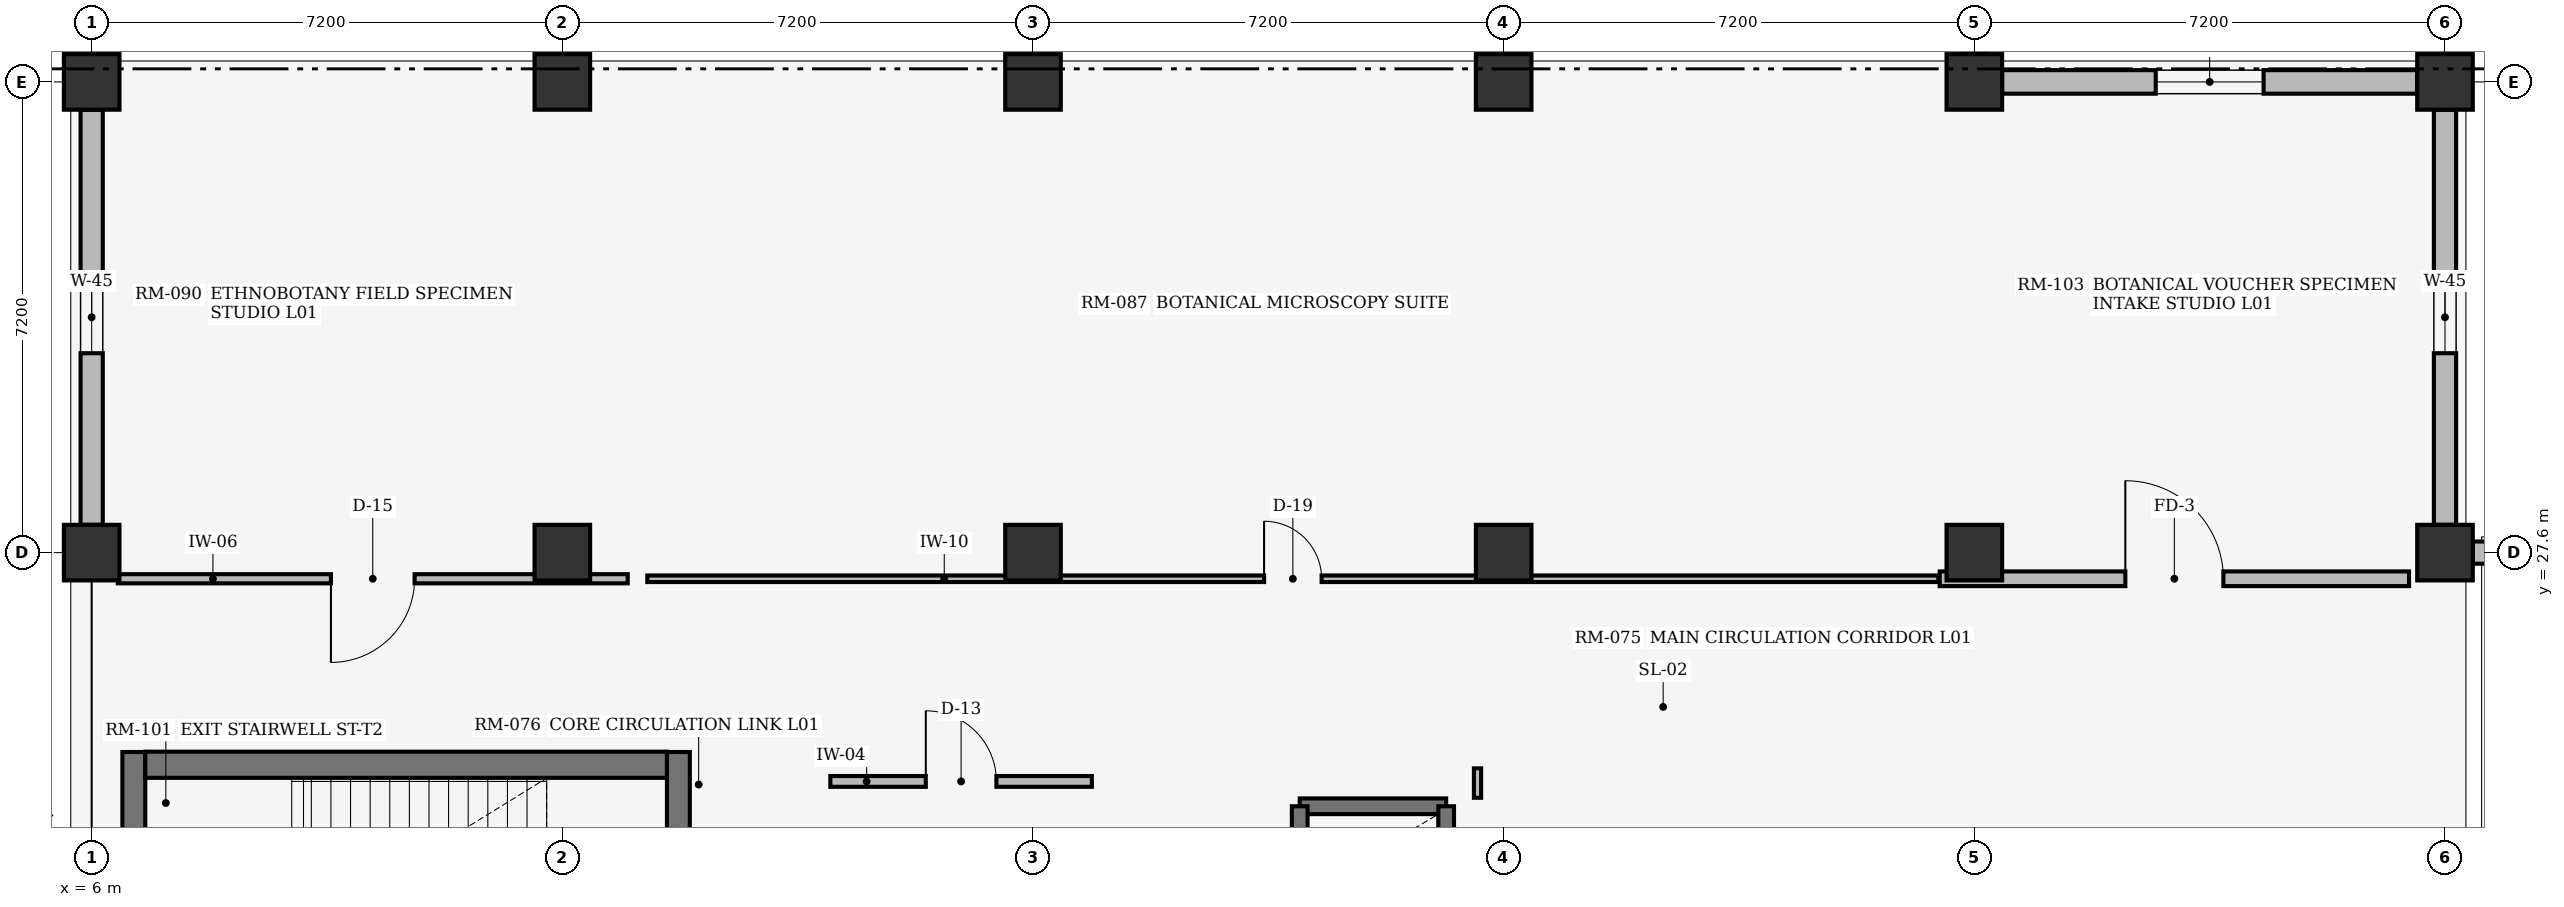
"""IFC4 building model, lengths in metres.
Left out: names, types, materials, properties, quantities, classifications, styles, units other than length and angle.
Written with IfcOpenShell. Run it as: python <this file> out.ifc"""

import sys

from ifc_helpers import new_model, si_unit, direction, frame, frame_2d, origin, origin_2d, place, context, subcontext, project, spatial, rectangle, extrude, element, fill, save


model = new_model("IFC4")
c1 = context("Model", 3, precision=1e-05, world=origin(), true_north=direction((0.0, 1.0)))
c2 = subcontext(c1, "Body", "Model", "MODEL_VIEW")
j1 = project(units=[si_unit("LENGTHUNIT", "METRE"), si_unit("PLANEANGLEUNIT", "RADIAN")], contexts=[c1])
p1 = place(None, origin())
s1 = spatial("IfcSite", under=j1, at=p1, CompositionType="ELEMENT")
p2 = place(p1, origin())
s2 = spatial("IfcBuilding", under=s1, at=p2, CompositionType="ELEMENT")
p3 = place(p2, frame((0.0, 0.0, 4.8)))
s3 = spatial("IfcBuildingStorey", under=s2, at=p3, CompositionType="ELEMENT", Elevation=4.8)
for number, where, z_axis, x_axis in (
    (1, (6.0, 27.6, 0.0), (0.0, 0.0, 1.0), (1.0, 0.0, 0.0)),
    (2, (6.0, 34.8, 0.0), (0.0, 0.0, 1.0), (1.0, 0.0, 0.0)),
    (3, (13.2, 27.6, 0.0), (0.0, 0.0, 1.0), (1.0, 0.0, 0.0)),
    (4, (13.2, 34.8, 0.0), (0.0, 0.0, 1.0), (1.0, 0.0, 0.0)),
    (5, (20.4, 27.6, 0.0), (0.0, 0.0, 1.0), (1.0, 0.0, 0.0)),
    (6, (20.4, 34.8, 0.0), (0.0, 0.0, 1.0), (1.0, 0.0, 0.0)),
    (7, (27.6, 27.6, 0.0), (0.0, 0.0, 1.0), (1.0, 0.0, 0.0)),
    (8, (27.6, 34.8, 0.0), (0.0, 0.0, 1.0), (1.0, 0.0, 0.0)),
    (9, (34.8, 27.6, 0.0), (0.0, 0.0, 1.0), (1.0, 0.0, 0.0)),
    (10, (34.8, 34.8, 0.0), (0.0, 0.0, 1.0), (1.0, 0.0, 0.0)),
    (11, (42.0, 27.6, 0.0), (0.0, 0.0, 1.0), (1.0, 0.0, 0.0)),
    (12, (42.0, 34.8, 0.0), (0.0, 0.0, 1.0), (1.0, 0.0, 0.0)),
):
    element("IfcColumn", number, at=place(p3, frame(where, z_axis=z_axis, x_axis=x_axis)), inside=s3, PredefinedType="COLUMN", context=c2, shape_type="SweptSolid", body=[
        extrude(rectangle(XDim=0.85, YDim=0.85, at=origin_2d()), origin(), (0.0, 0.0, 1.0), 3.95),
    ])
p4 = place(p3, frame((34.8, 35.225, 0.0), z_axis=(0.0, 0.0, 1.0), x_axis=(0.0, 1.0, 0.0)))
e13 = element("IfcWall", 13, at=p4, inside=s3, PredefinedType="STANDARD", context=c2, shape_type="SweptSolid", body=[
    extrude(rectangle(XDim=6.35, YDim=0.38, at=frame_2d((3.175, 0.0))), origin(), (0.0, 0.0, 1.0), 4.2),
])
p5 = place(p4, frame((2.625, 0.0, 0.75)))
e14 = element("IfcOpeningElement", 14, at=p5, cuts=e13, PredefinedType="OPENING", context=c2, shape_type="SweptSolid", body=[
    extrude(rectangle(XDim=1.1, YDim=1.25, at=frame_2d((0.55, 0.625))), frame((0.0, 0.2, 0.0), z_axis=(0.0, -1.0, 0.0), x_axis=(1.0, 0.0, 0.0)), (0.0, 0.0, 1.0), 0.4),
])
p6 = place(p3, frame((42.425, 27.6, 0.0), z_axis=(0.0, 0.0, 1.0), x_axis=(1.0, 0.0, 0.0)))
e15 = element("IfcWall", 15, at=p6, inside=s3, PredefinedType="STANDARD", context=c2, shape_type="SweptSolid", body=[
    extrude(rectangle(XDim=6.65, YDim=0.34, at=frame_2d((3.325, 0.0))), origin(), (0.0, 0.0, 1.0), 3.41),
])
p7 = place(p6, frame((2.45, 0.0, 0.75)))
e16 = element("IfcOpeningElement", 16, at=p7, cuts=e15, PredefinedType="OPENING", context=c2, shape_type="SweptSolid", body=[
    extrude(rectangle(XDim=1.75, YDim=1.65, at=frame_2d((0.875, 0.825))), frame((0.0, 0.18, 0.0), z_axis=(0.0, -1.0, 0.0), x_axis=(1.0, 0.0, 0.0)), (0.0, 0.0, 1.0), 0.36),
])
p8 = place(p3, frame((35.225, 34.8, 0.0), z_axis=(0.0, 0.0, 1.0), x_axis=(1.0, 0.0, 0.0)))
e17 = element("IfcWall", 17, at=p8, inside=s3, PredefinedType="STANDARD", context=c2, shape_type="SweptSolid", body=[
    extrude(rectangle(XDim=6.35, YDim=0.36, at=frame_2d((3.175, 0.0))), origin(), (0.0, 0.0, 1.0), 3.33),
])
p9 = place(p8, frame((2.35, 0.0, 0.75)))
e18 = element("IfcOpeningElement", 18, at=p9, cuts=e17, PredefinedType="OPENING", context=c2, shape_type="SweptSolid", body=[
    extrude(rectangle(XDim=1.65, YDim=1.5, at=frame_2d((0.825, 0.75))), frame((0.0, 0.19, 0.0), z_axis=(0.0, -1.0, 0.0), x_axis=(1.0, 0.0, 0.0)), (0.0, 0.0, 1.0), 0.38),
])
p10 = place(p3, frame((6.0, 28.025, 0.0), z_axis=(0.0, 0.0, 1.0), x_axis=(0.0, 1.0, 0.0)))
e19 = element("IfcWall", 19, at=p10, inside=s3, PredefinedType="STANDARD", context=c2, shape_type="SweptSolid", body=[
    extrude(rectangle(XDim=6.35, YDim=0.34, at=frame_2d((3.175, 0.0))), origin(), (0.0, 0.0, 1.0), 3.33),
])
p11 = place(p10, frame((2.625, 0.0, 0.75)))
e20 = element("IfcOpeningElement", 20, at=p11, cuts=e19, PredefinedType="OPENING", context=c2, shape_type="SweptSolid", body=[
    extrude(rectangle(XDim=1.1, YDim=1.25, at=frame_2d((0.55, 0.625))), frame((0.0, 0.18, 0.0), z_axis=(0.0, -1.0, 0.0), x_axis=(1.0, 0.0, 0.0)), (0.0, 0.0, 1.0), 0.36),
])
p12 = place(p3, frame((42.0, 28.025, 0.0), z_axis=(0.0, 0.0, 1.0), x_axis=(0.0, 1.0, 0.0)))
e21 = element("IfcWall", 21, at=p12, inside=s3, PredefinedType="STANDARD", context=c2, shape_type="SweptSolid", body=[
    extrude(rectangle(XDim=6.35, YDim=0.34, at=frame_2d((3.175, 0.0))), origin(), (0.0, 0.0, 1.0), 3.33),
])
p13 = place(p12, frame((2.625, 0.0, 0.75)))
e22 = element("IfcOpeningElement", 22, at=p13, cuts=e21, PredefinedType="OPENING", context=c2, shape_type="SweptSolid", body=[
    extrude(rectangle(XDim=1.1, YDim=1.25, at=frame_2d((0.55, 0.625))), frame((0.0, 0.18, 0.0), z_axis=(0.0, -1.0, 0.0), x_axis=(1.0, 0.0, 0.0)), (0.0, 0.0, 1.0), 0.36),
])
p14 = place(p3, frame((14.975, 24.55, 0.0), z_axis=(0.0, 0.0, 1.0), x_axis=(0.0, -1.0, 0.0)))
e23 = element("IfcWall", 23, at=p14, inside=s3, PredefinedType="SHEAR", context=c2, shape_type="SweptSolid", body=[
    extrude(rectangle(XDim=4.59, YDim=0.35, at=frame_2d((2.295, 0.0))), origin(), (0.0, 0.0, 1.0), 3.95),
])
p15 = place(p14, frame((1.72, 0.0, 0.0)))
e24 = element("IfcOpeningElement", 24, at=p15, cuts=e23, PredefinedType="OPENING", context=c2, shape_type="SweptSolid", body=[
    extrude(rectangle(XDim=1.15, YDim=2.2, at=frame_2d((0.575, 1.1))), frame((0.0, 0.185, 0.0), z_axis=(0.0, -1.0, 0.0), x_axis=(1.0, 0.0, 0.0)), (0.0, 0.0, 1.0), 0.37),
])
p16 = place(p3, frame((6.645, 24.55, 0.0), z_axis=(0.0, 0.0, 1.0), x_axis=(0.0, -1.0, 0.0)))
e25 = element("IfcWall", 25, at=p16, inside=s3, PredefinedType="SHEAR", context=c2, shape_type="SweptSolid", body=[
    extrude(rectangle(XDim=4.59, YDim=0.35, at=frame_2d((2.295, 0.0))), origin(), (0.0, 0.0, 1.0), 3.95),
])
p17 = place(p3, frame((14.8, 24.355, 0.0), z_axis=(0.0, 0.0, 1.0), x_axis=(-1.0, 0.0, 0.0)))
e26 = element("IfcWall", 26, at=p17, inside=s3, PredefinedType="SHEAR", context=c2, shape_type="SweptSolid", body=[
    extrude(rectangle(XDim=7.98, YDim=0.4, at=frame_2d((3.99, 0.0))), origin(), (0.0, 0.0, 1.0), 3.95),
])
p18 = place(p3, frame((24.48, 23.72, 0.0), z_axis=(0.0, 0.0, 1.0), x_axis=(1.0, 0.0, 0.0)))
e27 = element("IfcWall", 27, at=p18, inside=s3, PredefinedType="SHEAR", context=c2, shape_type="SweptSolid", body=[
    extrude(rectangle(XDim=2.24, YDim=0.24, at=frame_2d((1.12, 0.0))), origin(), (0.0, 0.0, 1.0), 3.95),
])
for number, where, z_axis, x_axis in (
    (28, (24.48, 20.78, 0.0), (0.0, 0.0, 1.0), (0.0, 1.0, 0.0)),
    (29, (26.72, 20.78, 0.0), (0.0, 0.0, 1.0), (0.0, 1.0, 0.0)),
):
    element("IfcWall", number, at=place(p3, frame(where, z_axis=z_axis, x_axis=x_axis)), inside=s3, PredefinedType="SHEAR", context=c2, shape_type="SweptSolid", body=[
        extrude(rectangle(XDim=2.94, YDim=0.24, at=frame_2d((1.47, 0.0))), origin(), (0.0, 0.0, 1.0), 3.95),
    ])
p19 = place(p3, frame((17.3, 24.1, 0.0), z_axis=(0.0, 0.0, 1.0), x_axis=(1.0, 0.0, 0.0)))
e30 = element("IfcWall", 30, at=p19, inside=s3, PredefinedType="PARTITIONING", context=c2, shape_type="SweptSolid", body=[
    extrude(rectangle(XDim=4.0, YDim=0.165, at=frame_2d((2.0, 0.0))), origin(), (0.0, 0.0, 1.0), 3.93),
])
p20 = place(p19, frame((1.46, 0.0, 0.0)))
e31 = element("IfcOpeningElement", 31, at=p20, cuts=e30, PredefinedType="OPENING", context=c2, shape_type="SweptSolid", body=[
    extrude(rectangle(XDim=1.08, YDim=2.1, at=frame_2d((0.54, 1.05))), frame((0.0, 0.093, 0.0), z_axis=(0.0, -1.0, 0.0), x_axis=(1.0, 0.0, 0.0)), (0.0, 0.0, 1.0), 0.185),
])
p21 = place(p3, frame((6.4, 27.2, 0.0), z_axis=(0.0, 0.0, 1.0), x_axis=(1.0, 0.0, 0.0)))
e32 = element("IfcWall", 32, at=p21, inside=s3, PredefinedType="PARTITIONING", context=c2, shape_type="SweptSolid", body=[
    extrude(rectangle(XDim=7.8, YDim=0.14, at=frame_2d((3.9, 0.0))), origin(), (0.0, 0.0, 1.0), 3.93),
])
p22 = place(p21, frame((3.26, 0.0, 0.0)))
e33 = element("IfcOpeningElement", 33, at=p22, cuts=e32, PredefinedType="OPENING", context=c2, shape_type="SweptSolid", body=[
    extrude(rectangle(XDim=1.28, YDim=2.15, at=frame_2d((0.64, 1.075))), frame((0.0, 0.08, 0.0), z_axis=(0.0, -1.0, 0.0), x_axis=(1.0, 0.0, 0.0)), (0.0, 0.0, 1.0), 0.16),
])
p23 = place(p3, frame((27.2, 24.3, 0.0), z_axis=(0.0, 0.0, 1.0), x_axis=(0.0, -1.0, 0.0)))
e34 = element("IfcWall", 34, at=p23, inside=s3, PredefinedType="PARTITIONING", context=c2, shape_type="SweptSolid", body=[
    extrude(rectangle(XDim=0.45, YDim=0.11, at=frame_2d((0.225, 0.0))), origin(), (0.0, 0.0, 1.0), 3.93),
])
p24 = place(p3, frame((14.5, 27.2, 0.0), z_axis=(0.0, 0.0, 1.0), x_axis=(1.0, 0.0, 0.0)))
e35 = element("IfcWall", 35, at=p24, inside=s3, PredefinedType="PARTITIONING", context=c2, shape_type="SweptSolid", body=[
    extrude(rectangle(XDim=19.75, YDim=0.1, at=frame_2d((9.875, 0.0))), origin(), (0.0, 0.0, 1.0), 3.93),
])
p25 = place(p24, frame((9.435, 0.0, 0.0)))
e36 = element("IfcOpeningElement", 36, at=p25, cuts=e35, PredefinedType="OPENING", context=c2, shape_type="SweptSolid", body=[
    extrude(rectangle(XDim=0.88, YDim=2.12, at=frame_2d((0.44, 1.06))), frame((0.0, 0.06, 0.0), z_axis=(0.0, -1.0, 0.0), x_axis=(1.0, 0.0, 0.0)), (0.0, 0.0, 1.0), 0.12),
])
p26 = place(p3, frame((34.27, 27.2, 0.0), z_axis=(0.0, 0.0, 1.0), x_axis=(1.0, 0.0, 0.0)))
e37 = element("IfcWall", 37, at=p26, inside=s3, PredefinedType="SOLIDWALL", context=c2, shape_type="SweptSolid", body=[
    extrude(rectangle(XDim=7.18, YDim=0.225, at=frame_2d((3.59, 0.0))), origin(), (0.0, 0.0, 1.0), 3.93),
])
p27 = place(p26, frame((2.84, 0.0, 0.0)))
e38 = element("IfcOpeningElement", 38, at=p27, cuts=e37, PredefinedType="OPENING", context=c2, shape_type="SweptSolid", body=[
    extrude(rectangle(XDim=1.5, YDim=2.2, at=frame_2d((0.75, 1.1))), frame((0.0, 0.123, 0.0), z_axis=(0.0, -1.0, 0.0), x_axis=(1.0, 0.0, 0.0)), (0.0, 0.0, 1.0), 0.245),
])
p28 = place(p9, origin())
e39 = element("IfcWindow", 39, at=p28, inside=s3, PartitioningType="SINGLE_PANEL", PredefinedType="WINDOW", context=c2, shape_type="SweptSolid", body=[
    extrude(rectangle(XDim=1.65, YDim=1.5, at=frame_2d((0.825, 0.75))), frame((0.0, 0.03, 0.0), z_axis=(0.0, -1.0, 0.0), x_axis=(1.0, 0.0, 0.0)), (0.0, 0.0, 1.0), 0.06),
])
fill(e18, e39)
p29 = place(p11, origin())
e40 = element("IfcWindow", 40, at=p29, inside=s3, PartitioningType="SINGLE_PANEL", PredefinedType="WINDOW", context=c2, shape_type="SweptSolid", body=[
    extrude(rectangle(XDim=1.1, YDim=1.25, at=frame_2d((0.55, 0.625))), frame((0.0, 0.03, 0.0), z_axis=(0.0, -1.0, 0.0), x_axis=(1.0, 0.0, 0.0)), (0.0, 0.0, 1.0), 0.06),
])
fill(e20, e40)
p30 = place(p13, origin())
e41 = element("IfcWindow", 41, at=p30, inside=s3, PartitioningType="SINGLE_PANEL", PredefinedType="WINDOW", context=c2, shape_type="SweptSolid", body=[
    extrude(rectangle(XDim=1.1, YDim=1.25, at=frame_2d((0.55, 0.625))), frame((0.0, 0.03, 0.0), z_axis=(0.0, -1.0, 0.0), x_axis=(1.0, 0.0, 0.0)), (0.0, 0.0, 1.0), 0.06),
])
fill(e22, e41)
p31 = place(p20, origin())
e42 = element("IfcDoor", 42, at=p31, inside=s3, OperationType="SINGLE_SWING_LEFT", PredefinedType="DOOR", context=c2, shape_type="SweptSolid", body=[
    extrude(rectangle(XDim=1.08, YDim=2.1, at=frame_2d((0.54, 1.05))), frame((0.0, 0.025, 0.0), z_axis=(0.0, -1.0, 0.0), x_axis=(1.0, 0.0, 0.0)), (0.0, 0.0, 1.0), 0.05),
])
fill(e31, e42)
p32 = place(p22, frame((1.28, 0.0, 0.0), z_axis=(0.0, 0.0, 1.0), x_axis=(-1.0, 0.0, 0.0)))
e43 = element("IfcDoor", 43, at=p32, inside=s3, OperationType="SINGLE_SWING_LEFT", PredefinedType="DOOR", context=c2, shape_type="SweptSolid", body=[
    extrude(rectangle(XDim=1.28, YDim=2.15, at=frame_2d((0.64, 1.075))), frame((0.0, 0.025, 0.0), z_axis=(0.0, -1.0, 0.0), x_axis=(1.0, 0.0, 0.0)), (0.0, 0.0, 1.0), 0.05),
])
fill(e33, e43)
p33 = place(p25, origin())
e44 = element("IfcDoor", 44, at=p33, inside=s3, OperationType="SINGLE_SWING_LEFT", PredefinedType="DOOR", context=c2, shape_type="SweptSolid", body=[
    extrude(rectangle(XDim=0.88, YDim=2.12, at=frame_2d((0.44, 1.06))), frame((0.0, 0.025, 0.0), z_axis=(0.0, -1.0, 0.0), x_axis=(1.0, 0.0, 0.0)), (0.0, 0.0, 1.0), 0.05),
])
fill(e36, e44)
p34 = place(p27, origin())
e45 = element("IfcDoor", 45, at=p34, inside=s3, OperationType="SINGLE_SWING_LEFT", PredefinedType="DOOR", context=c2, shape_type="SweptSolid", body=[
    extrude(rectangle(XDim=1.5, YDim=2.2, at=frame_2d((0.75, 1.1))), frame((0.0, 0.025, 0.0), z_axis=(0.0, -1.0, 0.0), x_axis=(1.0, 0.0, 0.0)), (0.0, 0.0, 1.0), 0.05),
])
fill(e38, e45)
save(model, sys.argv[1])
